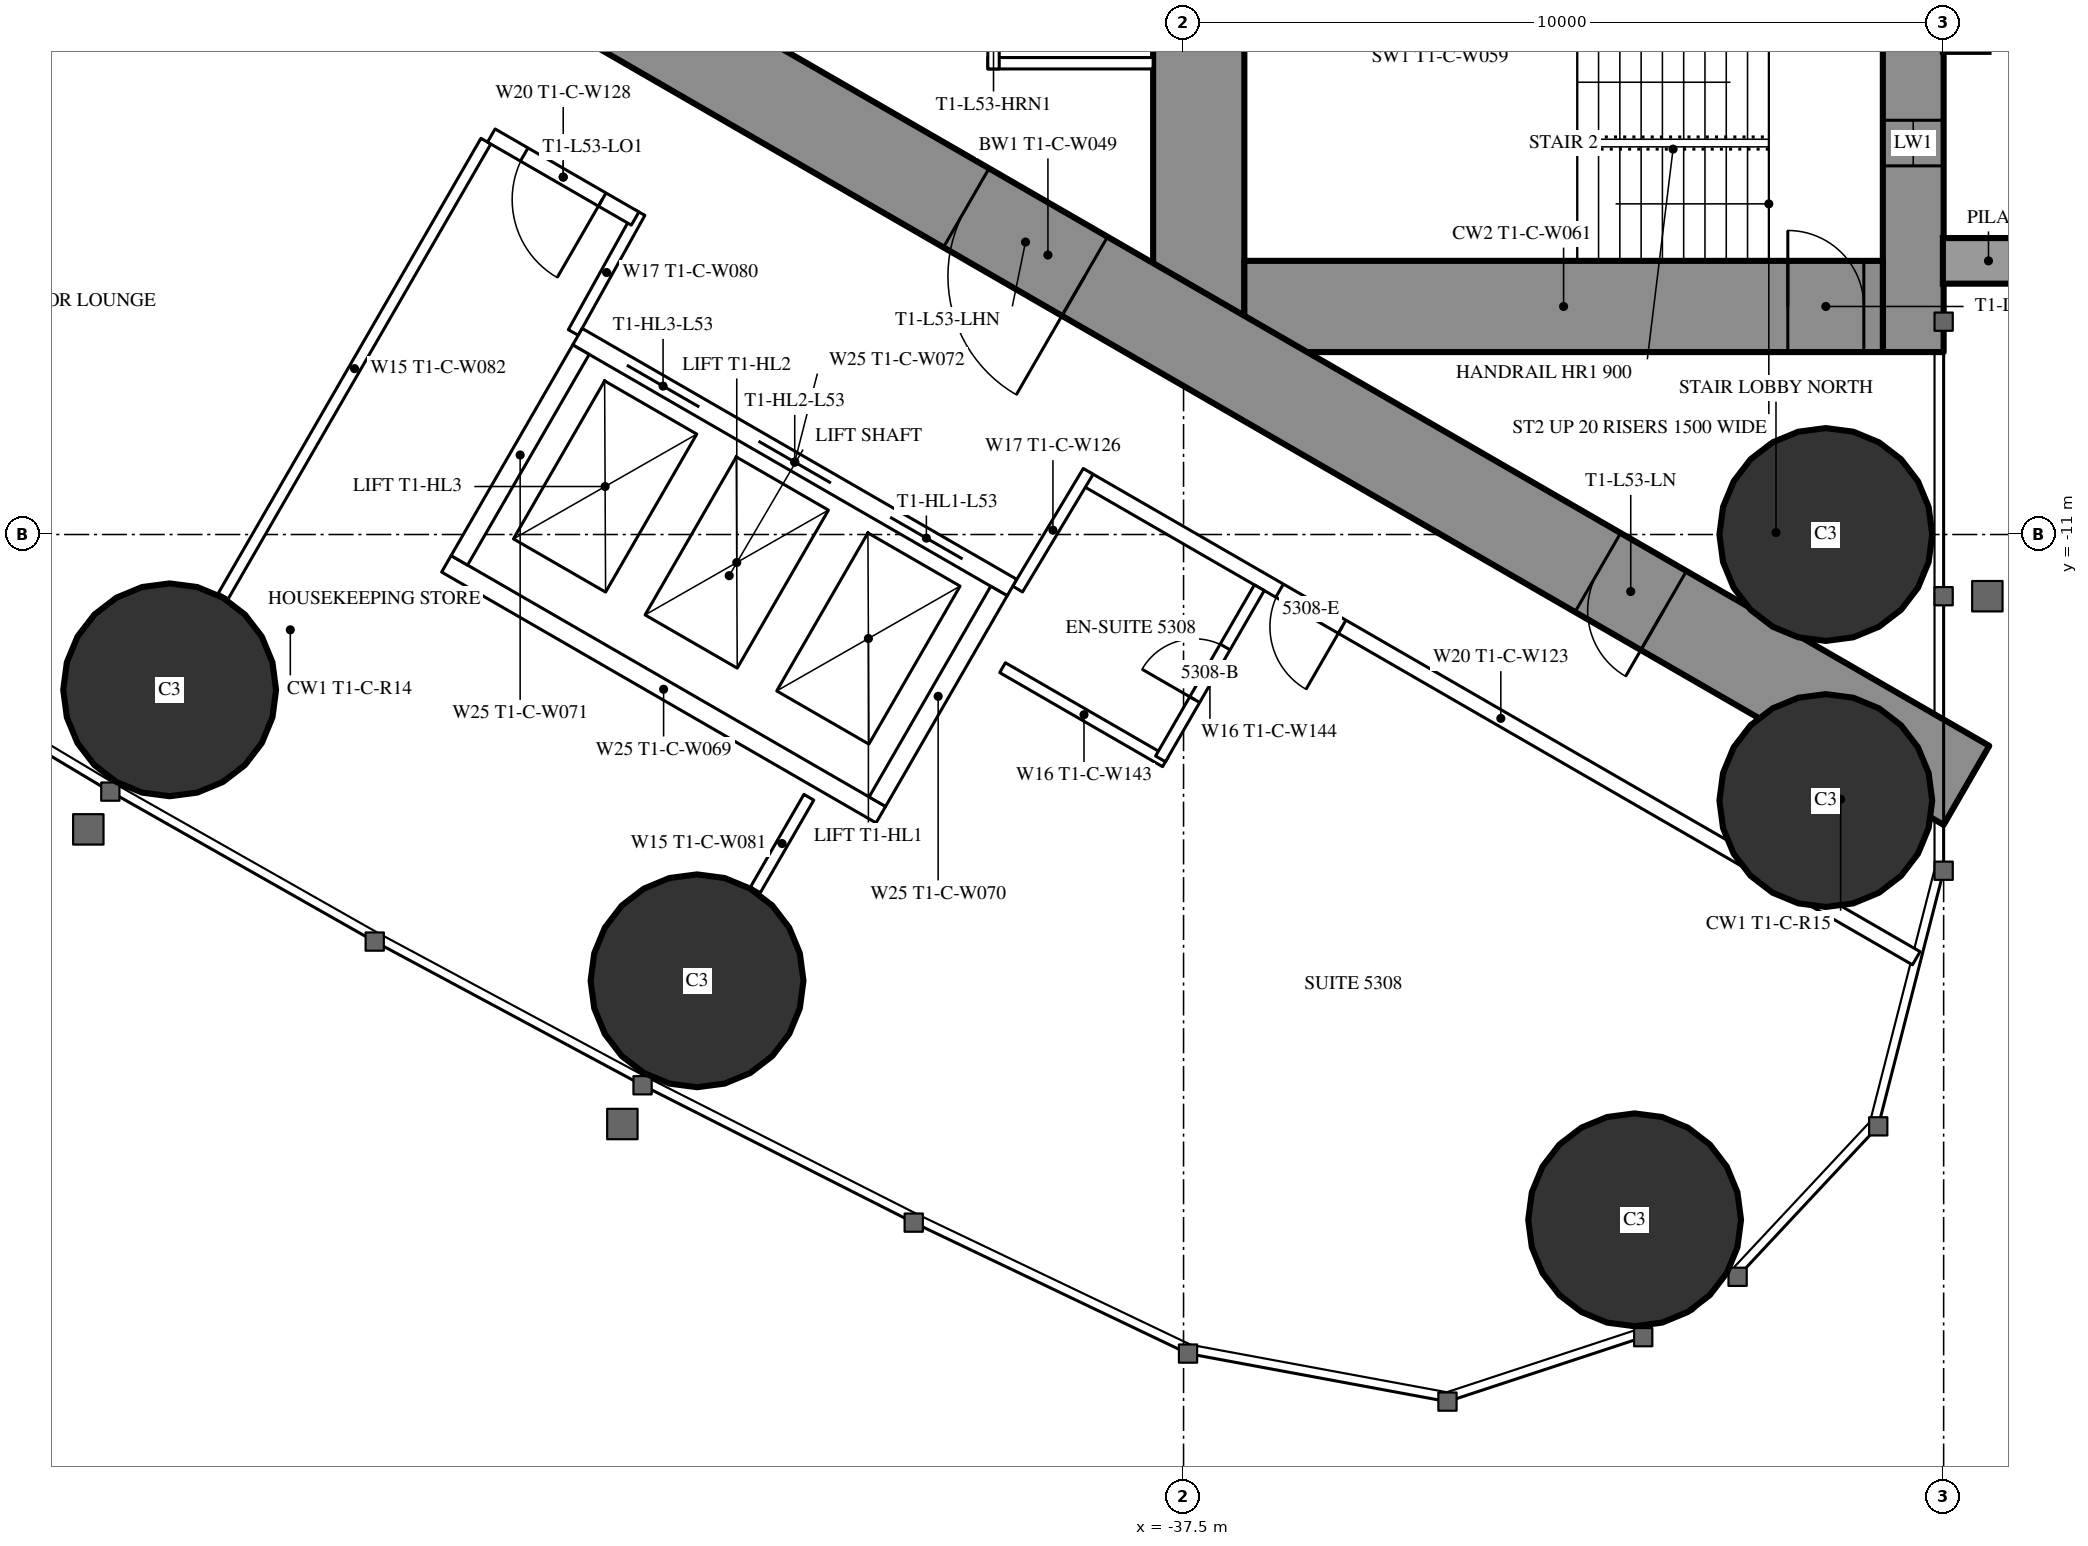
"""IFC4 building model, lengths in metres.
Left out: names, types, materials, properties, quantities, classifications, styles, units other than length and angle.
Written with IfcOpenShell. Run it as: python <this file> out.ifc"""

import sys

from ifc_helpers import new_model, si_unit, direction, frame, frame_2d, origin, origin_2d, place, context, subcontext, project, spatial, rectangle, circle, extrude, element, fill, save


model = new_model("IFC4")
c1 = context("Model", 3, precision=1e-05, world=origin(), true_north=direction((0.0, 1.0)))
c2 = subcontext(c1, "Body", "Model", "MODEL_VIEW")
j1 = project(units=[si_unit("LENGTHUNIT", "METRE"), si_unit("PLANEANGLEUNIT", "RADIAN")], contexts=[c1])
p1 = place(None, origin())
s1 = spatial("IfcSite", under=j1, at=p1, CompositionType="ELEMENT")
p2 = place(p1, origin())
s2 = spatial("IfcBuilding", under=s1, at=p2, CompositionType="ELEMENT")
p3 = place(p2, frame((0.0, 0.0, 198.3)))
s3 = spatial("IfcBuildingStorey", under=s2, at=p3, CompositionType="ELEMENT", Elevation=198.3)
for number, where, z_axis, x_axis in (
    (1, (-31.565, -20.016, 0.0), (0.0, 0.0, 1.0), (1.0, 0.0, 0.0)),
    (2, (-29.05, -11.0, 0.0), (0.0, 0.0, 1.0), (1.0, 0.0, 0.0)),
    (3, (-29.05, -14.5, 0.0), (0.0, 0.0, 1.0), (1.0, 0.0, 0.0)),
    (4, (-50.839, -13.043, 0.0), (0.0, 0.0, 1.0), (1.0, 0.0, 0.0)),
    (5, (-43.9, -16.871, 0.0), (0.0, 0.0, 1.0), (1.0, 0.0, 0.0)),
):
    element("IfcColumn", number, at=place(p3, frame(where, z_axis=z_axis, x_axis=x_axis)), inside=s3, PredefinedType="COLUMN", context=c2, shape_type="SweptSolid", body=[
        extrude(circle(Radius=1.4, at=origin_2d()), origin(), (0.0, 0.0, 1.0), 3.5),
    ])
p4 = place(p3, frame((-27.9, 8.6, 0.0), z_axis=(0.0, 0.0, 1.0), x_axis=(0.0, -1.0, 0.0)))
e6 = element("IfcWall", 6, at=p4, inside=s3, PredefinedType="SHEAR", context=c2, shape_type="SweptSolid", body=[
    extrude(rectangle(XDim=17.2, YDim=0.8, at=frame_2d((8.6, 0.0))), origin(), (0.0, 0.0, 1.0), 3.5),
])
p5 = place(p4, frame((2.45, 0.0, 0.6)))
e7 = element("IfcOpeningElement", 7, at=p5, cuts=e6, PredefinedType="OPENING", context=c2, shape_type="SweptSolid", body=[
    extrude(rectangle(XDim=0.6, YDim=2.1, at=frame_2d((0.3, 1.05))), frame((0.0, 0.41, 0.0), z_axis=(0.0, -1.0, 0.0), x_axis=(1.0, 0.0, 0.0)), (0.0, 0.0, 1.0), 0.82),
])
p6 = place(p4, frame((14.15, 0.0, 0.6)))
e8 = element("IfcOpeningElement", 8, at=p6, cuts=e6, PredefinedType="OPENING", context=c2, shape_type="SweptSolid", body=[
    extrude(rectangle(XDim=0.6, YDim=2.1, at=frame_2d((0.3, 1.05))), frame((0.0, 0.41, 0.0), z_axis=(0.0, -1.0, 0.0), x_axis=(1.0, 0.0, 0.0)), (0.0, 0.0, 1.0), 0.82),
])
p7 = place(p3, frame((-37.3, 8.6, 0.0), z_axis=(0.0, 0.0, 1.0), x_axis=(0.0, -1.0, 0.0)))
e9 = element("IfcWall", 9, at=p7, inside=s3, PredefinedType="SHEAR", context=c2, shape_type="SweptSolid", body=[
    extrude(rectangle(XDim=17.2, YDim=1.2, at=frame_2d((8.6, 0.0))), origin(), (0.0, 0.0, 1.0), 3.5),
])
p8 = place(p7, frame((7.7, 0.0, 0.0)))
e10 = element("IfcOpeningElement", 10, at=p8, cuts=e9, PredefinedType="OPENING", context=c2, shape_type="SweptSolid", body=[
    extrude(rectangle(XDim=1.8, YDim=2.2, at=frame_2d((0.9, 1.1))), frame((0.0, 0.61, 0.0), z_axis=(0.0, -1.0, 0.0), x_axis=(1.0, 0.0, 0.0)), (0.0, 0.0, 1.0), 1.22),
])
p9 = place(p3, frame((-28.3, -8.0, 0.0), z_axis=(0.0, 0.0, 1.0), x_axis=(-1.0, 0.0, 0.0)))
e11 = element("IfcWall", 11, at=p9, inside=s3, PredefinedType="SHEAR", context=c2, shape_type="SweptSolid", body=[
    extrude(rectangle(XDim=8.4, YDim=1.2, at=frame_2d((4.2, 0.0))), origin(), (0.0, 0.0, 1.0), 3.5),
])
p10 = place(p9, frame((0.25, 0.0, 0.0)))
e12 = element("IfcOpeningElement", 12, at=p10, cuts=e11, PredefinedType="OPENING", context=c2, shape_type="SweptSolid", body=[
    extrude(rectangle(XDim=1.0, YDim=2.2, at=frame_2d((0.5, 1.1))), frame((0.0, 0.61, 0.0), z_axis=(0.0, -1.0, 0.0), x_axis=(1.0, 0.0, 0.0)), (0.0, 0.0, 1.0), 1.22),
])
p11 = place(p3, frame((-27.2, -14.3, 0.0), z_axis=(0.0, 0.0, 1.0), x_axis=(-0.866024021859, 0.500002393557, 0.0)))
e13 = element("IfcWall", 13, at=p11, inside=s3, PredefinedType="SHEAR", context=c2, shape_type="SweptSolid", body=[
    extrude(rectangle(XDim=27.907, YDim=1.2, at=frame_2d((13.954, 0.0))), origin(), (0.0, 0.0, 1.0), 3.5),
])
p12 = place(p11, frame((4.6, 0.0, 0.0)))
e14 = element("IfcOpeningElement", 14, at=p12, cuts=e13, PredefinedType="OPENING", context=c2, shape_type="SweptSolid", body=[
    extrude(rectangle(XDim=1.0, YDim=2.2, at=frame_2d((0.5, 1.1))), frame((0.0, 0.61, 0.0), z_axis=(0.0, -1.0, 0.0), x_axis=(1.0, 0.0, 0.0)), (0.0, 0.0, 1.0), 1.22),
])
p13 = place(p11, frame((13.395, 0.0, 0.0)))
e15 = element("IfcOpeningElement", 15, at=p13, cuts=e13, PredefinedType="OPENING", context=c2, shape_type="SweptSolid", body=[
    extrude(rectangle(XDim=1.8, YDim=2.2, at=frame_2d((0.9, 1.1))), frame((0.0, 0.61, 0.0), z_axis=(0.0, -1.0, 0.0), x_axis=(1.0, 0.0, 0.0)), (0.0, 0.0, 1.0), 1.22),
])
p14 = place(p3, frame((-46.679, -5.825, 0.0), z_axis=(0.0, 0.0, 1.0), x_axis=(-0.500006839597, -0.866021454905, 0.0)))
e16 = element("IfcWall", 16, at=p14, inside=s3, PredefinedType="PARTITIONING", context=c2, shape_type="SweptSolid", body=[
    extrude(rectangle(XDim=6.911, YDim=0.15, at=frame_2d((3.456, 0.0))), origin(), (0.0, 0.0, 1.0), 2.3),
])
p15 = place(p3, frame((-42.429, -14.457, 0.0), z_axis=(0.0, 0.0, 1.0), x_axis=(-0.5000578829, -0.865991982497, 0.0)))
e17 = element("IfcWall", 17, at=p15, inside=s3, PredefinedType="PARTITIONING", context=c2, shape_type="SweptSolid", body=[
    extrude(rectangle(XDim=1.407, YDim=0.15, at=frame_2d((0.704, 0.0))), origin(), (0.0, 0.0, 1.0), 3.25),
])
p16 = place(p3, frame((-27.86, -16.575, 0.0), z_axis=(0.0, 0.0, 1.0), x_axis=(-0.866027756871, 0.499995924312, 0.0)))
e18 = element("IfcWall", 18, at=p16, inside=s3, PredefinedType="PARTITIONING", context=c2, shape_type="SweptSolid", body=[
    extrude(rectangle(XDim=12.622, YDim=0.2, at=frame_2d((6.311, 0.0))), origin(), (0.0, 0.0, 1.0), 3.25),
])
p17 = place(p16, frame((8.722, 0.0, 0.0)))
e19 = element("IfcOpeningElement", 19, at=p17, cuts=e18, PredefinedType="OPENING", context=c2, shape_type="SweptSolid", body=[
    extrude(rectangle(XDim=0.95, YDim=2.2, at=frame_2d((0.475, 1.1))), frame((0.0, 0.11, 0.0), z_axis=(0.0, -1.0, 0.0), x_axis=(1.0, 0.0, 0.0)), (0.0, 0.0, 1.0), 0.22),
])
for number, where, z_axis, x_axis in (
    (20, (-39.683, -11.718, 0.0), (0.0, 0.0, 1.0), (0.514, 0.858, 0.0)),
    (21, (-44.652, -6.764, 0.0), (0.0, 0.0, 1.0), (-0.485, -0.874, 0.0)),
):
    element("IfcWall", number, at=place(p3, frame(where, z_axis=z_axis, x_axis=x_axis)), inside=s3, PredefinedType="PARTITIONING", context=c2, shape_type="SweptSolid", body=[
        extrude(rectangle(XDim=1.805, YDim=0.15, at=frame_2d((0.903, 0.0))), origin(), (0.0, 0.0, 1.0), 3.25),
    ])
p18 = place(p3, frame((-44.715, -6.844, 0.0), z_axis=(0.0, 0.0, 1.0), x_axis=(-0.865999496279, 0.500044870432, 0.0)))
e22 = element("IfcWall", 22, at=p18, inside=s3, PredefinedType="PARTITIONING", context=c2, shape_type="SweptSolid", body=[
    extrude(rectangle(XDim=2.185, YDim=0.2, at=frame_2d((1.092, 0.0))), origin(), (0.0, 0.0, 1.0), 3.25),
])
p19 = place(p18, frame((0.5, 0.0, 0.0)))
e23 = element("IfcOpeningElement", 23, at=p19, cuts=e22, PredefinedType="OPENING", context=c2, shape_type="SweptSolid", body=[
    extrude(rectangle(XDim=1.185, YDim=2.2, at=frame_2d((0.593, 1.1))), frame((0.0, 0.11, 0.0), z_axis=(0.0, -1.0, 0.0), x_axis=(1.0, 0.0, 0.0)), (0.0, 0.0, 1.0), 0.22),
])
p20 = place(p3, frame((-37.738, -13.989, 0.0), z_axis=(0.0, 0.0, 1.0), x_axis=(-0.86604923931, 0.499958713387, 0.0)))
e24 = element("IfcWall", 24, at=p20, inside=s3, PredefinedType="PARTITIONING", context=c2, shape_type="SweptSolid", body=[
    extrude(rectangle(XDim=2.475, YDim=0.15, at=frame_2d((1.237, 0.0))), origin(), (0.0, 0.0, 1.0), 3.25),
])
p21 = place(p3, frame((-36.503, -11.7, 0.0), z_axis=(0.0, 0.0, 1.0), x_axis=(-0.500006934395, -0.866021400173, 0.0)))
e25 = element("IfcWall", 25, at=p21, inside=s3, PredefinedType="PARTITIONING", context=c2, shape_type="SweptSolid", body=[
    extrude(rectangle(XDim=2.6, YDim=0.15, at=frame_2d((1.3, 0.0))), origin(), (0.0, 0.0, 1.0), 3.25),
])
p22 = place(p21, frame((0.9, 0.0, 0.0)))
e26 = element("IfcOpeningElement", 26, at=p22, cuts=e25, PredefinedType="OPENING", context=c2, shape_type="SweptSolid", body=[
    extrude(rectangle(XDim=0.8, YDim=2.2, at=frame_2d((0.4, 1.1))), frame((0.0, 0.085, 0.0), z_axis=(0.0, -1.0, 0.0), x_axis=(1.0, 0.0, 0.0)), (0.0, 0.0, 1.0), 0.17),
])
p23 = place(p3, frame((-37.9, -4.8, 0.0), z_axis=(0.0, 0.0, 1.0), x_axis=(-1.0, 0.0, 0.0)))
e27 = element("IfcWall", 27, at=p23, inside=s3, PredefinedType="PARTITIONING", context=c2, shape_type="SweptSolid", body=[
    extrude(rectangle(XDim=2.175, YDim=0.15, at=frame_2d((1.087, 0.0))), origin(), (0.0, 0.0, 1.0), 3.25),
])
p24 = place(p3, frame((-40.0, -2.925, 0.0), z_axis=(0.0, 0.0, 1.0), x_axis=(0.0, -1.0, 0.0)))
e28 = element("IfcWall", 28, at=p24, inside=s3, PredefinedType="PARTITIONING", context=c2, shape_type="SweptSolid", body=[
    extrude(rectangle(XDim=1.95, YDim=0.15, at=frame_2d((0.975, 0.0))), origin(), (0.0, 0.0, 1.0), 3.25),
])
p25 = place(p24, frame((0.475, 0.0, 0.0)))
e29 = element("IfcOpeningElement", 29, at=p25, cuts=e28, PredefinedType="OPENING", context=c2, shape_type="SweptSolid", body=[
    extrude(rectangle(XDim=1.0, YDim=2.2, at=frame_2d((0.5, 1.1))), frame((0.0, 0.085, 0.0), z_axis=(0.0, -1.0, 0.0), x_axis=(1.0, 0.0, 0.0)), (0.0, 0.0, 1.0), 0.17),
])
p26 = place(p3, frame((-39.758, -11.697, 0.0), z_axis=(0.0, 0.0, 1.0), x_axis=(-0.866024194504, 0.500002094529, 0.0)))
e30 = element("IfcWall", 30, at=p26, inside=s3, PredefinedType="PARTITIONING", context=c2, shape_type="SweptSolid", body=[
    extrude(rectangle(XDim=6.6, YDim=0.25, at=frame_2d((3.3, 0.0))), origin(), (0.0, 0.0, 1.0), 3.25),
])
p27 = place(p26, frame((0.75, 0.0, 0.0)))
e31 = element("IfcOpeningElement", 31, at=p27, cuts=e30, PredefinedType="OPENING", context=c2, shape_type="SweptSolid", body=[
    extrude(rectangle(XDim=1.1, YDim=2.2, at=frame_2d((0.55, 1.1))), frame((0.0, 0.135, 0.0), z_axis=(0.0, -1.0, 0.0), x_axis=(1.0, 0.0, 0.0)), (0.0, 0.0, 1.0), 0.27),
])
p28 = place(p26, frame((2.75, 0.0, 0.0)))
e32 = element("IfcOpeningElement", 32, at=p28, cuts=e30, PredefinedType="OPENING", context=c2, shape_type="SweptSolid", body=[
    extrude(rectangle(XDim=1.1, YDim=2.2, at=frame_2d((0.55, 1.1))), frame((0.0, 0.135, 0.0), z_axis=(0.0, -1.0, 0.0), x_axis=(1.0, 0.0, 0.0)), (0.0, 0.0, 1.0), 0.27),
])
p29 = place(p26, frame((4.75, 0.0, 0.0)))
e33 = element("IfcOpeningElement", 33, at=p29, cuts=e30, PredefinedType="OPENING", context=c2, shape_type="SweptSolid", body=[
    extrude(rectangle(XDim=1.1, YDim=2.2, at=frame_2d((0.55, 1.1))), frame((0.0, 0.135, 0.0), z_axis=(0.0, -1.0, 0.0), x_axis=(1.0, 0.0, 0.0)), (0.0, 0.0, 1.0), 0.27),
])
p30 = place(p3, frame((-41.482, -14.686, 0.0), z_axis=(0.0, 0.0, 1.0), x_axis=(-0.86603344179, 0.499986077507, 0.0)))
e34 = element("IfcWall", 34, at=p30, inside=s3, PredefinedType="PARTITIONING", context=c2, shape_type="SweptSolid", body=[
    extrude(rectangle(XDim=6.6, YDim=0.25, at=frame_2d((3.3, 0.0))), origin(), (0.0, 0.0, 1.0), 3.25),
])
for number, where, z_axis, x_axis in (
    (35, (-39.928, -11.743, 0.0), (0.0, 0.0, 1.0), (-0.5, -0.866, 0.0)),
    (36, (-45.428, -8.568, 0.0), (0.0, 0.0, 1.0), (-0.5, -0.866, 0.0)),
):
    element("IfcWall", number, at=place(p3, frame(where, z_axis=z_axis, x_axis=x_axis)), inside=s3, PredefinedType="PARTITIONING", context=c2, shape_type="SweptSolid", body=[
        extrude(rectangle(XDim=3.201, YDim=0.25, at=frame_2d((1.6, 0.0))), origin(), (0.0, 0.0, 1.0), 3.25),
    ])
p31 = place(p22, origin())
e37 = element("IfcDoor", 37, at=p31, inside=s3, OperationType="SINGLE_SWING_RIGHT", PredefinedType="DOOR", context=c2, shape_type="SweptSolid", body=[
    extrude(rectangle(XDim=0.8, YDim=2.2, at=frame_2d((0.4, 1.1))), frame((0.0, 0.025, 0.0), z_axis=(0.0, -1.0, 0.0), x_axis=(1.0, 0.0, 0.0)), (0.0, 0.0, 1.0), 0.05),
])
fill(e26, e37)
p32 = place(p17, origin())
e38 = element("IfcDoor", 38, at=p32, inside=s3, OperationType="SINGLE_SWING_LEFT", PredefinedType="DOOR", context=c2, shape_type="SweptSolid", body=[
    extrude(rectangle(XDim=0.95, YDim=2.2, at=frame_2d((0.475, 1.1))), frame((0.0, 0.025, 0.0), z_axis=(0.0, -1.0, 0.0), x_axis=(1.0, 0.0, 0.0)), (0.0, 0.0, 1.0), 0.05),
])
fill(e19, e38)
p33 = place(p19, origin())
e39 = element("IfcDoor", 39, at=p33, inside=s3, OperationType="SINGLE_SWING_LEFT", PredefinedType="DOOR", context=c2, shape_type="SweptSolid", body=[
    extrude(rectangle(XDim=1.185, YDim=2.2, at=frame_2d((0.593, 1.1))), frame((0.0, 0.025, 0.0), z_axis=(0.0, -1.0, 0.0), x_axis=(1.0, 0.0, 0.0)), (0.0, 0.0, 1.0), 0.05),
])
fill(e23, e39)
p34 = place(p12, origin())
e40 = element("IfcDoor", 40, at=p34, inside=s3, OperationType="SINGLE_SWING_LEFT", PredefinedType="DOOR", context=c2, shape_type="SweptSolid", body=[
    extrude(rectangle(XDim=1.0, YDim=2.2, at=frame_2d((0.5, 1.1))), frame((0.0, 0.025, 0.0), z_axis=(0.0, -1.0, 0.0), x_axis=(1.0, 0.0, 0.0)), (0.0, 0.0, 1.0), 0.05),
])
fill(e14, e40)
p35 = place(p13, origin())
e41 = element("IfcDoor", 41, at=p35, inside=s3, OperationType="DOUBLE_DOOR_SINGLE_SWING", PredefinedType="DOOR", context=c2, shape_type="SweptSolid", body=[
    extrude(rectangle(XDim=1.8, YDim=2.2, at=frame_2d((0.9, 1.1))), frame((0.0, 0.025, 0.0), z_axis=(0.0, -1.0, 0.0), x_axis=(1.0, 0.0, 0.0)), (0.0, 0.0, 1.0), 0.05),
])
fill(e15, e41)
p36 = place(p10, origin())
e42 = element("IfcDoor", 42, at=p36, inside=s3, OperationType="SINGLE_SWING_RIGHT", PredefinedType="DOOR", context=c2, shape_type="SweptSolid", body=[
    extrude(rectangle(XDim=1.0, YDim=2.2, at=frame_2d((0.5, 1.1))), frame((0.0, 0.025, 0.0), z_axis=(0.0, -1.0, 0.0), x_axis=(1.0, 0.0, 0.0)), (0.0, 0.0, 1.0), 0.05),
])
fill(e12, e42)
p37 = place(p27, origin())
e43 = element("IfcDoor", 43, at=p37, inside=s3, OperationType="DOUBLE_DOOR_SLIDING", PredefinedType="USERDEFINED", context=c2, shape_type="SweptSolid", body=[
    extrude(rectangle(XDim=1.1, YDim=2.2, at=frame_2d((0.55, 1.1))), frame((0.0, 0.025, 0.0), z_axis=(0.0, -1.0, 0.0), x_axis=(1.0, 0.0, 0.0)), (0.0, 0.0, 1.0), 0.05),
])
fill(e31, e43)
p38 = place(p28, origin())
e44 = element("IfcDoor", 44, at=p38, inside=s3, OperationType="DOUBLE_DOOR_SLIDING", PredefinedType="USERDEFINED", context=c2, shape_type="SweptSolid", body=[
    extrude(rectangle(XDim=1.1, YDim=2.2, at=frame_2d((0.55, 1.1))), frame((0.0, 0.025, 0.0), z_axis=(0.0, -1.0, 0.0), x_axis=(1.0, 0.0, 0.0)), (0.0, 0.0, 1.0), 0.05),
])
fill(e32, e44)
p39 = place(p29, origin())
e45 = element("IfcDoor", 45, at=p39, inside=s3, OperationType="DOUBLE_DOOR_SLIDING", PredefinedType="USERDEFINED", context=c2, shape_type="SweptSolid", body=[
    extrude(rectangle(XDim=1.1, YDim=2.2, at=frame_2d((0.55, 1.1))), frame((0.0, 0.025, 0.0), z_axis=(0.0, -1.0, 0.0), x_axis=(1.0, 0.0, 0.0)), (0.0, 0.0, 1.0), 0.05),
])
fill(e33, e45)
p40 = place(p6, origin())
e46 = element("IfcWindow", 46, at=p40, inside=s3, PartitioningType="SINGLE_PANEL", PredefinedType="WINDOW", context=c2, shape_type="SweptSolid", body=[
    extrude(rectangle(XDim=0.6, YDim=2.1, at=frame_2d((0.3, 1.05))), frame((0.0, 0.03, 0.0), z_axis=(0.0, -1.0, 0.0), x_axis=(1.0, 0.0, 0.0)), (0.0, 0.0, 1.0), 0.06),
])
fill(e8, e46)
save(model, sys.argv[1])
